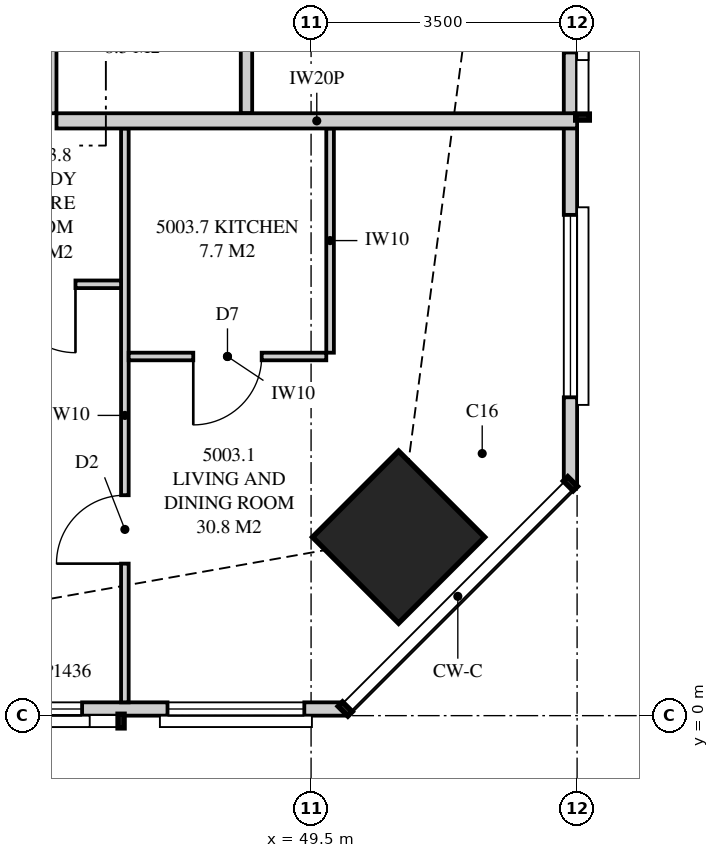
"""IFC4 building model, lengths in metres.
Left out: names, types, materials, properties, quantities, classifications, styles, units other than length and angle.
Written with IfcOpenShell. Run it as: python <this file> out.ifc"""

import sys

from ifc_helpers import new_model, si_unit, direction, frame, frame_2d, origin, origin_2d, place, context, subcontext, project, spatial, polyline, rectangle, outline, extrude, element, fill, save


model = new_model("IFC4")
c1 = context("Model", 3, precision=1e-05, world=origin(), true_north=direction((0.0, 1.0)))
c2 = subcontext(c1, "Body", "Model", "MODEL_VIEW")
j1 = project(units=[si_unit("LENGTHUNIT", "METRE"), si_unit("PLANEANGLEUNIT", "RADIAN")], contexts=[c1])
p1 = place(None, origin())
s1 = spatial("IfcSite", under=j1, at=p1, CompositionType="ELEMENT")
p2 = place(p1, origin())
s2 = spatial("IfcBuilding", under=s1, at=p2, CompositionType="ELEMENT")
p3 = place(p2, frame((0.0, 0.0, 184.5)))
s3 = spatial("IfcBuildingStorey", under=s2, at=p3, CompositionType="ELEMENT", Elevation=184.5)
p4 = place(p3, frame((50.652, 2.348, 0.0), z_axis=(0.0, 0.0, 1.0), x_axis=(0.707106781187, 0.707106781187, 0.0)))
e1 = element("IfcColumn", 1, at=p4, inside=s3, PredefinedType="COLUMN", context=c2, shape_type="SweptSolid", body=[
    extrude(rectangle(XDim=1.6, YDim=1.6, at=origin_2d()), origin(), (0.0, 0.0, 1.0), 3.35),
])
p5 = place(p3, frame((15.051, 0.087, 0.0), z_axis=(0.0, 0.0, 1.0), x_axis=(1.0, 0.0, 0.0)))
e2 = element("IfcWall", 2, at=p5, inside=s3, PredefinedType="SOLIDWALL", context=c2, shape_type="SweptSolid", body=[
    extrude(outline(polyline([(0.0, 0.0), (34.897, 0.0), (34.897, 3.11), (27.91, 3.11), (27.91, 2.15), (27.836, 2.15), (27.836, 3.11), (27.699, 3.11), (27.699, 2.15), (7.199, 2.15), (7.199, 3.11), (7.062, 3.11), (7.062, 2.15), (6.987, 2.15), (6.987, 3.11), (0.0, 3.11), (0.0, 0.0)])), frame((0.0, 0.087, 0.0), z_axis=(0.0, -1.0, 0.0), x_axis=(1.0, 0.0, 0.0)), (0.0, 0.0, 1.0), 0.175),
])
p6 = place(p5, frame((2.84, 0.0, 0.4)))
e3 = element("IfcOpeningElement", 3, at=p6, cuts=e2, PredefinedType="OPENING", context=c2, shape_type="SweptSolid", body=[
    extrude(rectangle(XDim=2.4, YDim=1.7, at=frame_2d((1.2, 0.85))), frame((0.0, 0.097, 0.0), z_axis=(0.0, -1.0, 0.0), x_axis=(1.0, 0.0, 0.0)), (0.0, 0.0, 1.0), 0.195),
])
p7 = place(p5, frame((9.149, 0.0, 0.4)))
e4 = element("IfcOpeningElement", 4, at=p7, cuts=e2, PredefinedType="OPENING", context=c2, shape_type="SweptSolid", body=[
    extrude(rectangle(XDim=1.8, YDim=1.7, at=frame_2d((0.9, 0.85))), frame((0.0, 0.097, 0.0), z_axis=(0.0, -1.0, 0.0), x_axis=(1.0, 0.0, 0.0)), (0.0, 0.0, 1.0), 0.195),
])
p8 = place(p5, frame((13.561, 0.0, 0.0)))
e5 = element("IfcOpeningElement", 5, at=p8, cuts=e2, PredefinedType="OPENING", context=c2, shape_type="SweptSolid", body=[
    extrude(rectangle(XDim=1.8, YDim=2.1, at=frame_2d((0.9, 1.05))), frame((0.0, 0.097, 0.0), z_axis=(0.0, -1.0, 0.0), x_axis=(1.0, 0.0, 0.0)), (0.0, 0.0, 1.0), 0.195),
])
p9 = place(p5, frame((19.849, 0.0, 0.4)))
e6 = element("IfcOpeningElement", 6, at=p9, cuts=e2, PredefinedType="OPENING", context=c2, shape_type="SweptSolid", body=[
    extrude(rectangle(XDim=1.8, YDim=1.7, at=frame_2d((0.9, 0.85))), frame((0.0, 0.097, 0.0), z_axis=(0.0, -1.0, 0.0), x_axis=(1.0, 0.0, 0.0)), (0.0, 0.0, 1.0), 0.195),
])
p10 = place(p5, frame((23.449, 0.0, 0.4)))
e7 = element("IfcOpeningElement", 7, at=p10, cuts=e2, PredefinedType="OPENING", context=c2, shape_type="SweptSolid", body=[
    extrude(rectangle(XDim=1.8, YDim=1.7, at=frame_2d((0.9, 0.85))), frame((0.0, 0.097, 0.0), z_axis=(0.0, -1.0, 0.0), x_axis=(1.0, 0.0, 0.0)), (0.0, 0.0, 1.0), 0.195),
])
p11 = place(p5, frame((29.636, 0.0, 0.4)))
e8 = element("IfcOpeningElement", 8, at=p11, cuts=e2, PredefinedType="OPENING", context=c2, shape_type="SweptSolid", body=[
    extrude(rectangle(XDim=1.8, YDim=1.7, at=frame_2d((0.9, 0.85))), frame((0.0, 0.097, 0.0), z_axis=(0.0, -1.0, 0.0), x_axis=(1.0, 0.0, 0.0)), (0.0, 0.0, 1.0), 0.195),
])
p12 = place(p5, frame((32.56, 0.0, 0.4)))
e9 = element("IfcOpeningElement", 9, at=p12, cuts=e2, PredefinedType="OPENING", context=c2, shape_type="SweptSolid", body=[
    extrude(rectangle(XDim=1.8, YDim=1.7, at=frame_2d((0.9, 0.85))), frame((0.0, 0.097, 0.0), z_axis=(0.0, -1.0, 0.0), x_axis=(1.0, 0.0, 0.0)), (0.0, 0.0, 1.0), 0.195),
])
p13 = place(p3, frame((52.913, 3.051, 0.0), z_axis=(0.0, 0.0, 1.0), x_axis=(0.0, 1.0, 0.0)))
e10 = element("IfcWall", 10, at=p13, inside=s3, PredefinedType="SOLIDWALL", context=c2, shape_type="SweptSolid", body=[
    extrude(outline(polyline([(0.0, 0.0), (29.897, 0.0), (29.897, 3.11), (22.167, 3.11), (22.167, 2.15), (22.074, 2.15), (22.074, 3.11), (21.949, 3.11), (21.949, 2.15), (9.949, 2.15), (9.949, 3.11), (9.847, 3.11), (9.847, 2.15), (9.706, 2.15), (9.706, 3.11), (0.0, 3.11), (0.0, 0.0)])), frame((0.0, 0.087, 0.0), z_axis=(0.0, -1.0, 0.0), x_axis=(1.0, 0.0, 0.0)), (0.0, 0.0, 1.0), 0.175),
])
p14 = place(p13, frame((1.137, 0.0, 0.4)))
e11 = element("IfcOpeningElement", 11, at=p14, cuts=e10, PredefinedType="OPENING", context=c2, shape_type="SweptSolid", body=[
    extrude(rectangle(XDim=2.4, YDim=1.7, at=frame_2d((1.2, 0.85))), frame((0.0, 0.097, 0.0), z_axis=(0.0, -1.0, 0.0), x_axis=(1.0, 0.0, 0.0)), (0.0, 0.0, 1.0), 0.195),
])
p15 = place(p13, frame((5.674, 0.0, 0.4)))
e12 = element("IfcOpeningElement", 12, at=p15, cuts=e10, PredefinedType="OPENING", context=c2, shape_type="SweptSolid", body=[
    extrude(rectangle(XDim=1.8, YDim=1.7, at=frame_2d((0.9, 0.85))), frame((0.0, 0.097, 0.0), z_axis=(0.0, -1.0, 0.0), x_axis=(1.0, 0.0, 0.0)), (0.0, 0.0, 1.0), 0.195),
])
p16 = place(p13, frame((11.902, 0.0, 0.4)))
e13 = element("IfcOpeningElement", 13, at=p16, cuts=e10, PredefinedType="OPENING", context=c2, shape_type="SweptSolid", body=[
    extrude(rectangle(XDim=2.4, YDim=1.7, at=frame_2d((1.2, 0.85))), frame((0.0, 0.097, 0.0), z_axis=(0.0, -1.0, 0.0), x_axis=(1.0, 0.0, 0.0)), (0.0, 0.0, 1.0), 0.195),
])
p17 = place(p13, frame((15.324, 0.0, 0.0)))
e14 = element("IfcOpeningElement", 14, at=p17, cuts=e10, PredefinedType="OPENING", context=c2, shape_type="SweptSolid", body=[
    extrude(rectangle(XDim=1.8, YDim=2.1, at=frame_2d((0.9, 1.05))), frame((0.0, 0.097, 0.0), z_axis=(0.0, -1.0, 0.0), x_axis=(1.0, 0.0, 0.0)), (0.0, 0.0, 1.0), 0.195),
])
p18 = place(p13, frame((23.874, 0.0, 0.4)))
e15 = element("IfcOpeningElement", 15, at=p18, cuts=e10, PredefinedType="OPENING", context=c2, shape_type="SweptSolid", body=[
    extrude(rectangle(XDim=1.8, YDim=1.7, at=frame_2d((0.9, 0.85))), frame((0.0, 0.097, 0.0), z_axis=(0.0, -1.0, 0.0), x_axis=(1.0, 0.0, 0.0)), (0.0, 0.0, 1.0), 0.195),
])
p19 = place(p13, frame((26.871, 0.0, 0.4)))
e16 = element("IfcOpeningElement", 16, at=p19, cuts=e10, PredefinedType="OPENING", context=c2, shape_type="SweptSolid", body=[
    extrude(rectangle(XDim=1.8, YDim=1.7, at=frame_2d((0.9, 0.85))), frame((0.0, 0.097, 0.0), z_axis=(0.0, -1.0, 0.0), x_axis=(1.0, 0.0, 0.0)), (0.0, 0.0, 1.0), 0.195),
])
p20 = place(p3, frame((47.05, 0.175, 0.0), z_axis=(0.0, 0.0, 1.0), x_axis=(0.0, 1.0, 0.0)))
e17 = element("IfcWall", 17, at=p20, inside=s3, PredefinedType="PARTITIONING", context=c2, shape_type="SweptSolid", body=[
    extrude(outline(polyline([(0.0, 0.0), (7.55, 0.0), (7.55, 3.11), (2.409, 3.11), (2.409, 2.15), (0.663, 2.15), (0.663, 3.11), (0.0, 3.11), (0.0, 0.0)])), frame((0.0, 0.05, 0.0), z_axis=(0.0, -1.0, 0.0), x_axis=(1.0, 0.0, 0.0)), (0.0, 0.0, 1.0), 0.1),
])
p21 = place(p20, frame((1.825, 0.0, 0.0)))
e18 = element("IfcOpeningElement", 18, at=p21, cuts=e17, PredefinedType="OPENING", context=c2, shape_type="SweptSolid", body=[
    extrude(rectangle(XDim=0.9, YDim=2.1, at=frame_2d((0.45, 1.05))), frame((0.0, 0.06, 0.0), z_axis=(0.0, -1.0, 0.0), x_axis=(1.0, 0.0, 0.0)), (0.0, 0.0, 1.0), 0.12),
])
p22 = place(p3, frame((47.1, 4.725, 0.0), z_axis=(0.0, 0.0, 1.0), x_axis=(1.0, 0.0, 0.0)))
e19 = element("IfcWall", 19, at=p22, inside=s3, PredefinedType="PARTITIONING", context=c2, shape_type="SweptSolid", body=[
    extrude(rectangle(XDim=2.6, YDim=0.1, at=frame_2d((1.3, 0.0))), origin(), (0.0, 0.0, 1.0), 3.11),
])
p23 = place(p22, frame((0.85, 0.0, 0.0)))
e20 = element("IfcOpeningElement", 20, at=p23, cuts=e19, PredefinedType="OPENING", context=c2, shape_type="SweptSolid", body=[
    extrude(rectangle(XDim=0.9, YDim=2.1, at=frame_2d((0.45, 1.05))), frame((0.0, 0.06, 0.0), z_axis=(0.0, -1.0, 0.0), x_axis=(1.0, 0.0, 0.0)), (0.0, 0.0, 1.0), 0.12),
])
p24 = place(p3, frame((49.75, 4.775, 0.0), z_axis=(0.0, 0.0, 1.0), x_axis=(0.0, 1.0, 0.0)))
e21 = element("IfcWall", 21, at=p24, inside=s3, PredefinedType="PARTITIONING", context=c2, shape_type="SweptSolid", body=[
    extrude(rectangle(XDim=2.95, YDim=0.1, at=frame_2d((1.475, 0.0))), origin(), (0.0, 0.0, 1.0), 3.11),
])
p25 = place(p3, frame((46.15, 7.825, 0.0), z_axis=(0.0, 0.0, 1.0), x_axis=(1.0, 0.0, 0.0)))
e22 = element("IfcWall", 22, at=p25, inside=s3, PredefinedType="PARTITIONING", context=c2, shape_type="SweptSolid", body=[
    extrude(outline(polyline([(0.0, 0.0), (6.85, 0.0), (6.85, 3.11), (6.138, 3.11), (6.138, 2.15), (4.303, 2.15), (4.303, 3.11), (0.0, 3.11), (0.0, 0.0)])), frame((0.0, 0.1, 0.0), z_axis=(0.0, -1.0, 0.0), x_axis=(1.0, 0.0, 0.0)), (0.0, 0.0, 1.0), 0.2),
])
p26 = place(p3, frame((46.05, 7.925, 0.0), z_axis=(0.0, 0.0, 1.0), x_axis=(0.0, 1.0, 0.0)))
e23 = element("IfcWall", 23, at=p26, inside=s3, PredefinedType="PARTITIONING", context=c2, shape_type="SweptSolid", body=[
    extrude(outline(polyline([(0.0, 0.0), (13.775, 0.0), (13.775, 3.11), (5.412, 3.11), (5.412, 2.541), (4.738, 2.541), (4.738, 3.11), (0.0, 3.11), (0.0, 0.0)])), frame((0.0, 0.1, 0.0), z_axis=(0.0, -1.0, 0.0), x_axis=(1.0, 0.0, 0.0)), (0.0, 0.0, 1.0), 0.2),
])
p27 = place(p26, frame((6.387, 0.0, 0.0)))
e24 = element("IfcOpeningElement", 24, at=p27, cuts=e23, PredefinedType="OPENING", context=c2, shape_type="SweptSolid", body=[
    extrude(rectangle(XDim=1.05, YDim=2.2, at=frame_2d((0.525, 1.1))), frame((0.0, 0.11, 0.0), z_axis=(0.0, -1.0, 0.0), x_axis=(1.0, 0.0, 0.0)), (0.0, 0.0, 1.0), 0.22),
])
p28 = place(p3, frame((48.65, 7.925, 0.0), z_axis=(0.0, 0.0, 1.0), x_axis=(0.0, 1.0, 0.0)))
e25 = element("IfcWall", 25, at=p28, inside=s3, PredefinedType="PLUMBINGWALL", context=c2, shape_type="SweptSolid", body=[
    extrude(rectangle(XDim=3.45, YDim=0.15, at=frame_2d((1.725, 0.0))), origin(), (0.0, 0.0, 1.0), 3.11),
])
p29 = place(p28, frame((2.15, 0.0, 0.0)))
e26 = element("IfcOpeningElement", 26, at=p29, cuts=e25, PredefinedType="OPENING", context=c2, shape_type="SweptSolid", body=[
    extrude(rectangle(XDim=0.9, YDim=2.1, at=frame_2d((0.45, 1.05))), frame((0.0, 0.085, 0.0), z_axis=(0.0, -1.0, 0.0), x_axis=(1.0, 0.0, 0.0)), (0.0, 0.0, 1.0), 0.17),
])
p30 = place(p3, frame((47.0, 5.675, 0.0), z_axis=(0.0, 0.0, 1.0), x_axis=(-1.0, 0.0, 0.0)))
e27 = element("IfcWall", 27, at=p30, inside=s3, PredefinedType="PARTITIONING", context=c2, shape_type="SweptSolid", body=[
    extrude(rectangle(XDim=2.1, YDim=0.1, at=frame_2d((1.05, 0.0))), origin(), (0.0, 0.0, 1.0), 3.11),
])
p31 = place(p30, frame((0.6, 0.0, 0.0)))
e28 = element("IfcOpeningElement", 28, at=p31, cuts=e27, PredefinedType="OPENING", context=c2, shape_type="SweptSolid", body=[
    extrude(rectangle(XDim=0.9, YDim=2.1, at=frame_2d((0.45, 1.05))), frame((0.0, 0.06, 0.0), z_axis=(0.0, -1.0, 0.0), x_axis=(1.0, 0.0, 0.0)), (0.0, 0.0, 1.0), 0.12),
])
p32 = place(p11, origin())
e29 = element("IfcWindow", 29, at=p32, inside=s3, PartitioningType="SINGLE_PANEL", PredefinedType="WINDOW", context=c2, shape_type="SweptSolid", body=[
    extrude(rectangle(XDim=1.8, YDim=1.7, at=frame_2d((0.9, 0.85))), frame((0.0, 0.03, 0.0), z_axis=(0.0, -1.0, 0.0), x_axis=(1.0, 0.0, 0.0)), (0.0, 0.0, 1.0), 0.06),
])
fill(e8, e29)
p33 = place(p12, origin())
e30 = element("IfcWindow", 30, at=p33, inside=s3, PartitioningType="SINGLE_PANEL", PredefinedType="WINDOW", context=c2, shape_type="SweptSolid", body=[
    extrude(rectangle(XDim=1.8, YDim=1.7, at=frame_2d((0.9, 0.85))), frame((0.0, 0.03, 0.0), z_axis=(0.0, -1.0, 0.0), x_axis=(1.0, 0.0, 0.0)), (0.0, 0.0, 1.0), 0.06),
])
fill(e9, e30)
p34 = place(p14, origin())
e31 = element("IfcWindow", 31, at=p34, inside=s3, PartitioningType="SINGLE_PANEL", PredefinedType="WINDOW", context=c2, shape_type="SweptSolid", body=[
    extrude(rectangle(XDim=2.4, YDim=1.7, at=frame_2d((1.2, 0.85))), frame((0.0, 0.03, 0.0), z_axis=(0.0, -1.0, 0.0), x_axis=(1.0, 0.0, 0.0)), (0.0, 0.0, 1.0), 0.06),
])
fill(e11, e31)
p35 = place(p15, origin())
e32 = element("IfcWindow", 32, at=p35, inside=s3, PartitioningType="SINGLE_PANEL", PredefinedType="WINDOW", context=c2, shape_type="SweptSolid", body=[
    extrude(rectangle(XDim=1.8, YDim=1.7, at=frame_2d((0.9, 0.85))), frame((0.0, 0.03, 0.0), z_axis=(0.0, -1.0, 0.0), x_axis=(1.0, 0.0, 0.0)), (0.0, 0.0, 1.0), 0.06),
])
fill(e12, e32)
p36 = place(p21, origin())
e33 = element("IfcDoor", 33, at=p36, inside=s3, OperationType="SINGLE_SWING_LEFT", PredefinedType="DOOR", context=c2, shape_type="SweptSolid", body=[
    extrude(rectangle(XDim=0.9, YDim=2.1, at=frame_2d((0.45, 1.05))), frame((0.0, 0.025, 0.0), z_axis=(0.0, -1.0, 0.0), x_axis=(1.0, 0.0, 0.0)), (0.0, 0.0, 1.0), 0.05),
])
fill(e18, e33)
p37 = place(p23, frame((0.9, 0.0, 0.0), z_axis=(0.0, 0.0, 1.0), x_axis=(-1.0, 0.0, 0.0)))
e34 = element("IfcDoor", 34, at=p37, inside=s3, OperationType="SINGLE_SWING_RIGHT", PredefinedType="DOOR", context=c2, shape_type="SweptSolid", body=[
    extrude(rectangle(XDim=0.9, YDim=2.1, at=frame_2d((0.45, 1.05))), frame((0.0, 0.025, 0.0), z_axis=(0.0, -1.0, 0.0), x_axis=(1.0, 0.0, 0.0)), (0.0, 0.0, 1.0), 0.05),
])
fill(e20, e34)
p38 = place(p31, origin())
e35 = element("IfcDoor", 35, at=p38, inside=s3, OperationType="SINGLE_SWING_LEFT", PredefinedType="DOOR", context=c2, shape_type="SweptSolid", body=[
    extrude(rectangle(XDim=0.9, YDim=2.1, at=frame_2d((0.45, 1.05))), frame((0.0, 0.025, 0.0), z_axis=(0.0, -1.0, 0.0), x_axis=(1.0, 0.0, 0.0)), (0.0, 0.0, 1.0), 0.05),
])
fill(e28, e35)
save(model, sys.argv[1])
